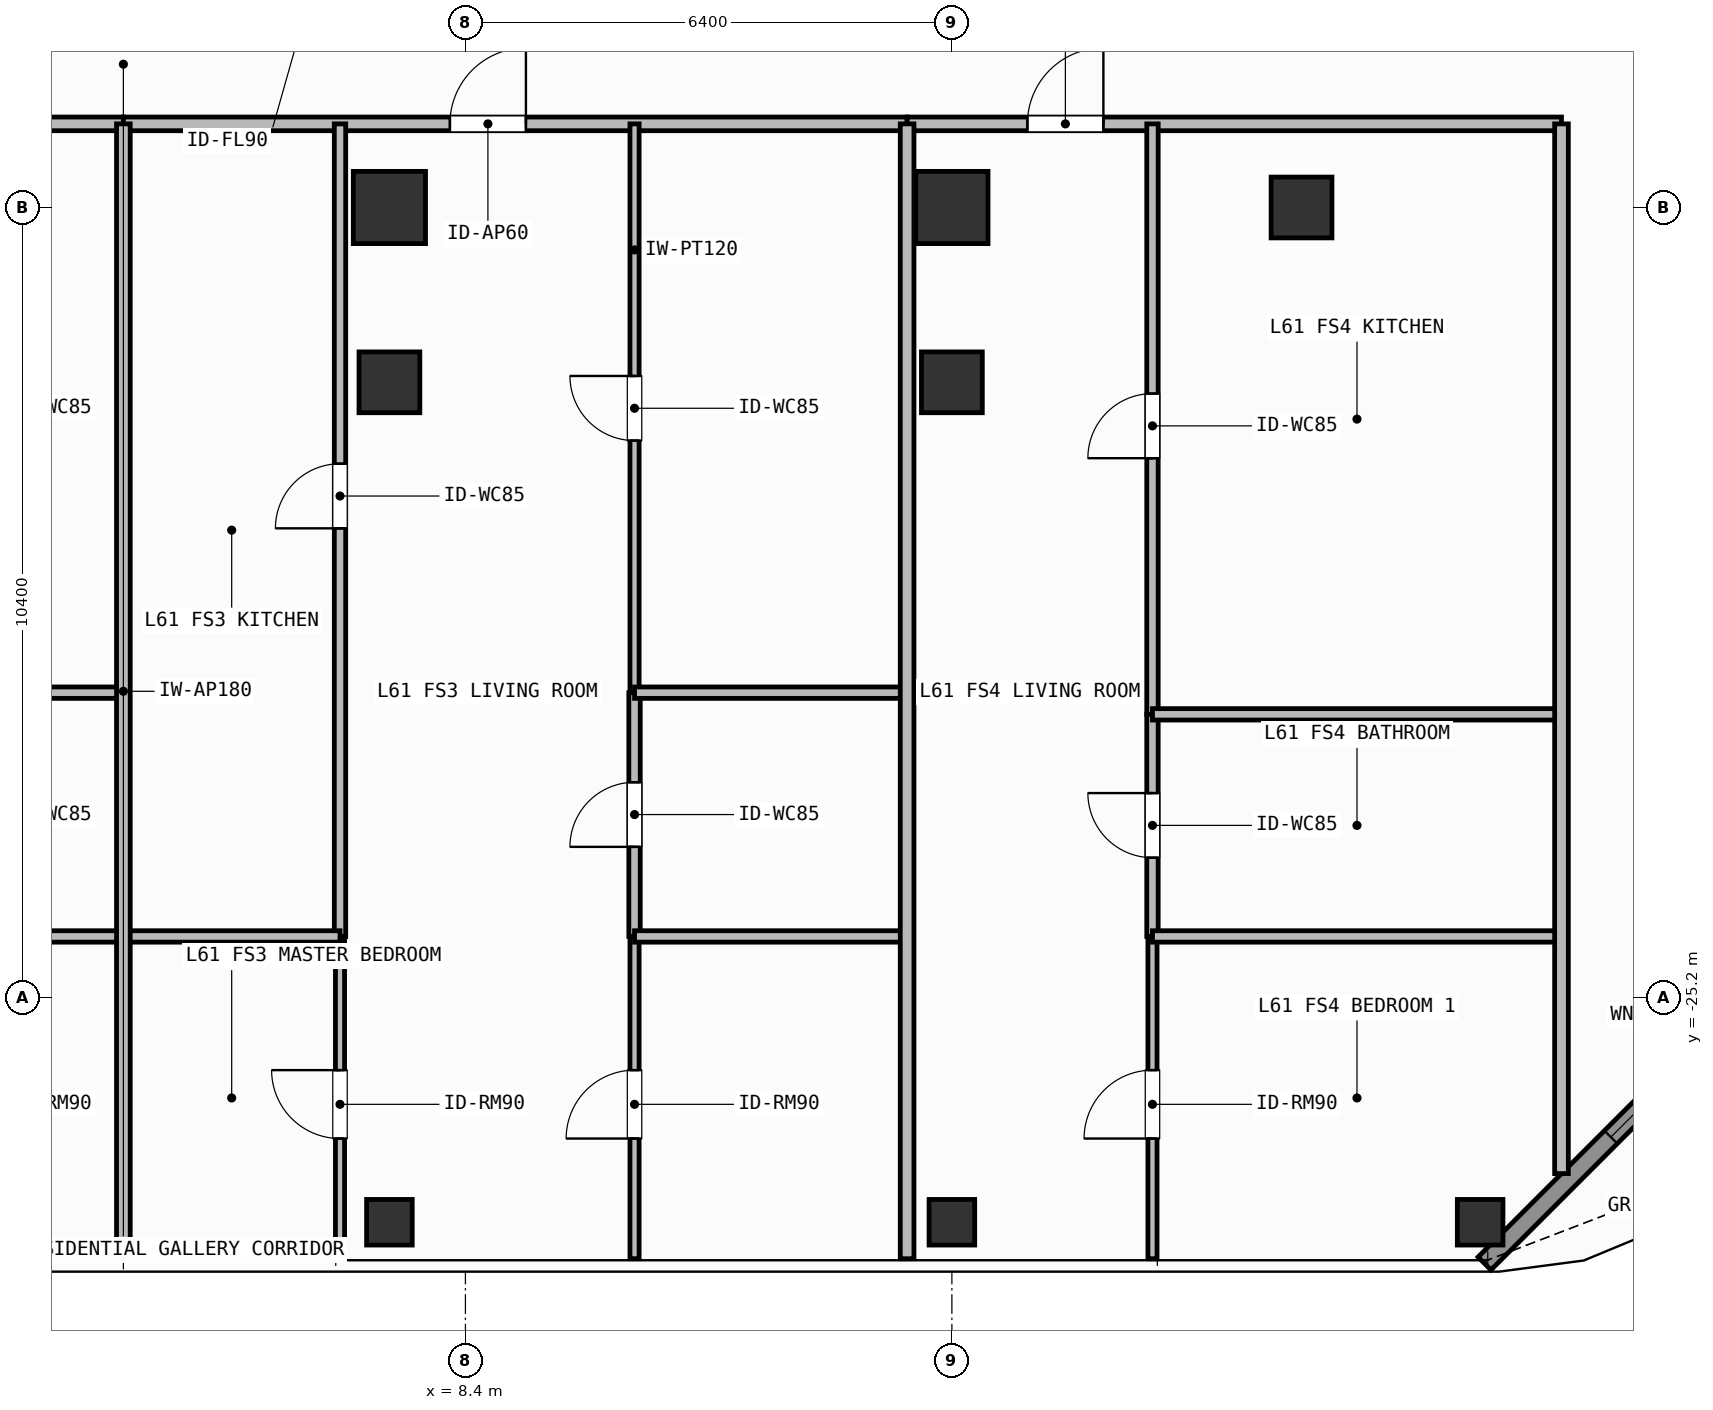
"""IFC4 building model, lengths in metres.
Left out: names, types, materials, properties, quantities, classifications, styles, units other than length and angle.
Written with IfcOpenShell. Run it as: python <this file> out.ifc"""

import sys

from ifc_helpers import new_model, si_unit, direction, frame, frame_2d, origin, origin_2d, place, context, subcontext, project, spatial, rectangle, hollow_rectangle, extrude, element, fill, save


model = new_model("IFC4")
c1 = context("Model", 3, precision=1e-05, world=origin(), true_north=direction((0.0, 1.0)))
c2 = subcontext(c1, "Body", "Model", "MODEL_VIEW")
j1 = project(units=[si_unit("LENGTHUNIT", "METRE"), si_unit("PLANEANGLEUNIT", "RADIAN")], contexts=[c1])
p1 = place(None, origin())
s1 = spatial("IfcSite", under=j1, at=p1, CompositionType="ELEMENT")
p2 = place(p1, origin())
s2 = spatial("IfcBuilding", under=s1, at=p2, CompositionType="ELEMENT")
p3 = place(p2, frame((0.0, 0.0, 250.8)))
s3 = spatial("IfcBuildingStorey", under=s2, at=p3, CompositionType="ELEMENT", Elevation=250.8)
for number, where, z_axis, x_axis in (
    (1, (7.4, -14.8, 0.0), (0.0, 0.0, 1.0), (1.0, 0.0, 0.0)),
    (2, (14.8, -14.8, 0.0), (0.0, 0.0, 1.0), (1.0, 0.0, 0.0)),
):
    element("IfcColumn", number, at=place(p3, frame(where, z_axis=z_axis, x_axis=x_axis)), inside=s3, PredefinedType="COLUMN", context=c2, shape_type="SweptSolid", body=[
        extrude(rectangle(XDim=0.95, YDim=0.95, at=origin_2d()), origin(), (0.0, 0.0, 1.0), 3.9),
    ])
for number, where, z_axis, x_axis in (
    (3, (19.4, -14.8, 0.0), (0.0, 0.0, 1.0), (1.0, 0.0, 0.0)),
    (4, (7.4, -17.1, 0.0), (0.0, 0.0, 1.0), (1.0, 0.0, 0.0)),
    (5, (14.8, -17.1, 0.0), (0.0, 0.0, 1.0), (1.0, 0.0, 0.0)),
):
    element("IfcColumn", number, at=place(p3, frame(where, z_axis=z_axis, x_axis=x_axis)), inside=s3, PredefinedType="COLUMN", context=c2, shape_type="SweptSolid", body=[
        extrude(hollow_rectangle(XDim=0.8, YDim=0.8, WallThickness=0.036, at=origin_2d()), origin(), (0.0, 0.0, 1.0), 3.9),
    ])
for number, where, z_axis, x_axis in (
    (6, (21.75, -28.15, 0.0), (0.0, 0.0, 1.0), (1.0, 0.0, 0.0)),
    (7, (7.4, -28.15, 0.0), (0.0, 0.0, 1.0), (1.0, 0.0, 0.0)),
    (8, (14.8, -28.15, 0.0), (0.0, 0.0, 1.0), (1.0, 0.0, 0.0)),
):
    element("IfcColumn", number, at=place(p3, frame(where, z_axis=z_axis, x_axis=x_axis)), inside=s3, PredefinedType="COLUMN", context=c2, shape_type="SweptSolid", body=[
        extrude(hollow_rectangle(XDim=0.6, YDim=0.6, WallThickness=0.028, at=origin_2d()), origin(), (0.0, 0.0, 1.0), 3.9),
    ])
p4 = place(p3, frame((26.192, -24.308, 0.0), z_axis=(0.0, 0.0, 1.0), x_axis=(-0.707106781187, -0.707106781187, 0.0)))
e9 = element("IfcWall", 9, at=p4, inside=s3, PredefinedType="SOLIDWALL", context=c2, shape_type="SweptSolid", body=[
    extrude(rectangle(XDim=6.201, YDim=0.24, at=frame_2d((3.101, 0.0))), origin(), (0.0, 0.0, 1.0), 3.62),
])
p5 = place(p4, frame((2.351, 0.0, 0.8)))
e10 = element("IfcOpeningElement", 10, at=p5, cuts=e9, PredefinedType="OPENING", context=c2, shape_type="SweptSolid", body=[
    extrude(rectangle(XDim=1.5, YDim=1.85, at=frame_2d((0.75, 0.925))), frame((0.0, 0.13, 0.0), z_axis=(0.0, -1.0, 0.0), x_axis=(1.0, 0.0, 0.0)), (0.0, 0.0, 1.0), 0.26),
])
p6 = place(p3, frame((-6.695, -13.7, 0.0), z_axis=(0.0, 0.0, 1.0), x_axis=(1.0, 0.0, 0.0)))
e11 = element("IfcWall", 11, at=p6, inside=s3, PredefinedType="PARTITIONING", context=c2, shape_type="SweptSolid", body=[
    extrude(rectangle(XDim=10.595, YDim=0.18, at=frame_2d((5.297, 0.0))), origin(), (0.0, 0.0, 1.0), 3.62),
])
p7 = place(p6, frame((5.154, 0.0, 0.0)))
e12 = element("IfcOpeningElement", 12, at=p7, cuts=e11, PredefinedType="OPENING", context=c2, shape_type="SweptSolid", body=[
    extrude(rectangle(XDim=1.0, YDim=2.2, at=frame_2d((0.5, 1.1))), frame((0.0, 0.1, 0.0), z_axis=(0.0, -1.0, 0.0), x_axis=(1.0, 0.0, 0.0)), (0.0, 0.0, 1.0), 0.2),
])
p8 = place(p3, frame((3.9, -13.7, 0.0), z_axis=(0.0, 0.0, 1.0), x_axis=(1.0, 0.0, 0.0)))
e13 = element("IfcWall", 13, at=p8, inside=s3, PredefinedType="PARTITIONING", context=c2, shape_type="SweptSolid", body=[
    extrude(rectangle(XDim=10.311, YDim=0.18, at=frame_2d((5.156, 0.0))), origin(), (0.0, 0.0, 1.0), 3.62),
])
p9 = place(p8, frame((4.296, 0.0, 0.0)))
e14 = element("IfcOpeningElement", 14, at=p9, cuts=e13, PredefinedType="OPENING", context=c2, shape_type="SweptSolid", body=[
    extrude(rectangle(XDim=1.0, YDim=2.2, at=frame_2d((0.5, 1.1))), frame((0.0, 0.1, 0.0), z_axis=(0.0, -1.0, 0.0), x_axis=(1.0, 0.0, 0.0)), (0.0, 0.0, 1.0), 0.2),
])
p10 = place(p3, frame((6.75, -24.39, 0.0), z_axis=(0.0, 0.0, 1.0), x_axis=(0.0, 1.0, 0.0)))
e15 = element("IfcWall", 15, at=p10, inside=s3, PredefinedType="PARTITIONING", context=c2, shape_type="SweptSolid", body=[
    extrude(rectangle(XDim=10.69, YDim=0.15, at=frame_2d((5.345, 0.0))), origin(), (0.0, 0.0, 1.0), 3.62),
])
p11 = place(p10, frame((5.369, 0.0, 0.0)))
e16 = element("IfcOpeningElement", 16, at=p11, cuts=e15, PredefinedType="OPENING", context=c2, shape_type="SweptSolid", body=[
    extrude(rectangle(XDim=0.85, YDim=2.1, at=frame_2d((0.425, 1.05))), frame((0.0, 0.085, 0.0), z_axis=(0.0, -1.0, 0.0), x_axis=(1.0, 0.0, 0.0)), (0.0, 0.0, 1.0), 0.17),
])
p12 = place(p3, frame((6.75, -28.63, 0.0), z_axis=(0.0, 0.0, 1.0), x_axis=(0.0, 1.0, 0.0)))
e17 = element("IfcWall", 17, at=p12, inside=s3, PredefinedType="PARTITIONING", context=c2, shape_type="SweptSolid", body=[
    extrude(rectangle(XDim=4.24, YDim=0.12, at=frame_2d((2.12, 0.0))), origin(), (0.0, 0.0, 1.0), 3.62),
])
p13 = place(p12, frame((1.581, 0.0, 0.0)))
e18 = element("IfcOpeningElement", 18, at=p13, cuts=e17, PredefinedType="OPENING", context=c2, shape_type="SweptSolid", body=[
    extrude(rectangle(XDim=0.9, YDim=2.1, at=frame_2d((0.45, 1.05))), frame((0.0, 0.07, 0.0), z_axis=(0.0, -1.0, 0.0), x_axis=(1.0, 0.0, 0.0)), (0.0, 0.0, 1.0), 0.14),
])
p14 = place(p3, frame((10.625, -24.39, 0.0), z_axis=(0.0, 0.0, 1.0), x_axis=(0.0, 1.0, 0.0)))
e19 = element("IfcWall", 19, at=p14, inside=s3, PredefinedType="PARTITIONING", context=c2, shape_type="SweptSolid", body=[
    extrude(rectangle(XDim=3.207, YDim=0.15, at=frame_2d((1.604, 0.0))), origin(), (0.0, 0.0, 1.0), 3.62),
])
p15 = place(p14, frame((1.178, 0.0, 0.0)))
e20 = element("IfcOpeningElement", 20, at=p15, cuts=e19, PredefinedType="OPENING", context=c2, shape_type="SweptSolid", body=[
    extrude(rectangle(XDim=0.85, YDim=2.1, at=frame_2d((0.425, 1.05))), frame((0.0, 0.085, 0.0), z_axis=(0.0, -1.0, 0.0), x_axis=(1.0, 0.0, 0.0)), (0.0, 0.0, 1.0), 0.17),
])
p16 = place(p3, frame((10.625, -21.183, 0.0), z_axis=(0.0, 0.0, 1.0), x_axis=(0.0, 1.0, 0.0)))
e21 = element("IfcWall", 21, at=p16, inside=s3, PredefinedType="PARTITIONING", context=c2, shape_type="SweptSolid", body=[
    extrude(rectangle(XDim=7.483, YDim=0.12, at=frame_2d((3.742, 0.0))), origin(), (0.0, 0.0, 1.0), 3.62),
])
p17 = place(p16, frame((3.316, 0.0, 0.0)))
e22 = element("IfcOpeningElement", 22, at=p17, cuts=e21, PredefinedType="OPENING", context=c2, shape_type="SweptSolid", body=[
    extrude(rectangle(XDim=0.85, YDim=2.1, at=frame_2d((0.425, 1.05))), frame((0.0, 0.07, 0.0), z_axis=(0.0, -1.0, 0.0), x_axis=(1.0, 0.0, 0.0)), (0.0, 0.0, 1.0), 0.14),
])
p18 = place(p3, frame((10.625, -28.63, 0.0), z_axis=(0.0, 0.0, 1.0), x_axis=(0.0, 1.0, 0.0)))
e23 = element("IfcWall", 23, at=p18, inside=s3, PredefinedType="PARTITIONING", context=c2, shape_type="SweptSolid", body=[
    extrude(rectangle(XDim=4.24, YDim=0.12, at=frame_2d((2.12, 0.0))), origin(), (0.0, 0.0, 1.0), 3.62),
])
p19 = place(p18, frame((1.581, 0.0, 0.0)))
e24 = element("IfcOpeningElement", 24, at=p19, cuts=e23, PredefinedType="OPENING", context=c2, shape_type="SweptSolid", body=[
    extrude(rectangle(XDim=0.9, YDim=2.1, at=frame_2d((0.45, 1.05))), frame((0.0, 0.07, 0.0), z_axis=(0.0, -1.0, 0.0), x_axis=(1.0, 0.0, 0.0)), (0.0, 0.0, 1.0), 0.14),
])
p20 = place(p3, frame((14.211, -13.7, 0.0), z_axis=(0.0, 0.0, 1.0), x_axis=(1.0, 0.0, 0.0)))
e25 = element("IfcWall", 25, at=p20, inside=s3, PredefinedType="PARTITIONING", context=c2, shape_type="SweptSolid", body=[
    extrude(rectangle(XDim=8.609, YDim=0.18, at=frame_2d((4.305, 0.0))), origin(), (0.0, 0.0, 1.0), 3.62),
])
p21 = place(p20, frame((1.582, 0.0, 0.0)))
e26 = element("IfcOpeningElement", 26, at=p21, cuts=e25, PredefinedType="OPENING", context=c2, shape_type="SweptSolid", body=[
    extrude(rectangle(XDim=1.0, YDim=2.2, at=frame_2d((0.5, 1.1))), frame((0.0, 0.1, 0.0), z_axis=(0.0, -1.0, 0.0), x_axis=(1.0, 0.0, 0.0)), (0.0, 0.0, 1.0), 0.2),
])
p22 = place(p3, frame((17.439, -21.468, 0.0), z_axis=(0.0, 0.0, 1.0), x_axis=(0.0, 1.0, 0.0)))
e27 = element("IfcWall", 27, at=p22, inside=s3, PredefinedType="PARTITIONING", context=c2, shape_type="SweptSolid", body=[
    extrude(rectangle(XDim=7.768, YDim=0.15, at=frame_2d((3.884, 0.0))), origin(), (0.0, 0.0, 1.0), 3.62),
])
p23 = place(p22, frame((3.37, 0.0, 0.0)))
e28 = element("IfcOpeningElement", 28, at=p23, cuts=e27, PredefinedType="OPENING", context=c2, shape_type="SweptSolid", body=[
    extrude(rectangle(XDim=0.85, YDim=2.1, at=frame_2d((0.425, 1.05))), frame((0.0, 0.085, 0.0), z_axis=(0.0, -1.0, 0.0), x_axis=(1.0, 0.0, 0.0)), (0.0, 0.0, 1.0), 0.17),
])
p24 = place(p3, frame((17.439, -24.39, 0.0), z_axis=(0.0, 0.0, 1.0), x_axis=(0.0, 1.0, 0.0)))
e29 = element("IfcWall", 29, at=p24, inside=s3, PredefinedType="PARTITIONING", context=c2, shape_type="SweptSolid", body=[
    extrude(rectangle(XDim=2.922, YDim=0.15, at=frame_2d((1.461, 0.0))), origin(), (0.0, 0.0, 1.0), 3.62),
])
p25 = place(p24, frame((1.036, 0.0, 0.0)))
e30 = element("IfcOpeningElement", 30, at=p25, cuts=e29, PredefinedType="OPENING", context=c2, shape_type="SweptSolid", body=[
    extrude(rectangle(XDim=0.85, YDim=2.1, at=frame_2d((0.425, 1.05))), frame((0.0, 0.085, 0.0), z_axis=(0.0, -1.0, 0.0), x_axis=(1.0, 0.0, 0.0)), (0.0, 0.0, 1.0), 0.17),
])
p26 = place(p3, frame((17.439, -28.63, 0.0), z_axis=(0.0, 0.0, 1.0), x_axis=(0.0, 1.0, 0.0)))
e31 = element("IfcWall", 31, at=p26, inside=s3, PredefinedType="PARTITIONING", context=c2, shape_type="SweptSolid", body=[
    extrude(rectangle(XDim=4.24, YDim=0.12, at=frame_2d((2.12, 0.0))), origin(), (0.0, 0.0, 1.0), 3.62),
])
p27 = place(p26, frame((1.581, 0.0, 0.0)))
e32 = element("IfcOpeningElement", 32, at=p27, cuts=e31, PredefinedType="OPENING", context=c2, shape_type="SweptSolid", body=[
    extrude(rectangle(XDim=0.9, YDim=2.1, at=frame_2d((0.45, 1.05))), frame((0.0, 0.07, 0.0), z_axis=(0.0, -1.0, 0.0), x_axis=(1.0, 0.0, 0.0)), (0.0, 0.0, 1.0), 0.14),
])
for number, where, z_axis, x_axis in (
    (33, (1.05, -21.183, 0.0), (0.0, 0.0, 1.0), (1.0, 0.0, 0.0)),
    (34, (1.05, -24.39, 0.0), (0.0, 0.0, 1.0), (1.0, 0.0, 0.0)),
):
    element("IfcWall", number, at=place(p3, frame(where, z_axis=z_axis, x_axis=x_axis)), inside=s3, PredefinedType="PARTITIONING", context=c2, shape_type="SweptSolid", body=[
        extrude(rectangle(XDim=2.85, YDim=0.15, at=frame_2d((1.425, 0.0))), origin(), (0.0, 0.0, 1.0), 3.62),
    ])
p28 = place(p3, frame((3.9, -24.39, 0.0), z_axis=(0.0, 0.0, 1.0), x_axis=(1.0, 0.0, 0.0)))
e35 = element("IfcWall", 35, at=p28, inside=s3, PredefinedType="PARTITIONING", context=c2, shape_type="SweptSolid", body=[
    extrude(rectangle(XDim=2.85, YDim=0.15, at=frame_2d((1.425, 0.0))), origin(), (0.0, 0.0, 1.0), 3.62),
])
for number, where, z_axis, x_axis in (
    (36, (10.625, -21.183, 0.0), (0.0, 0.0, 1.0), (1.0, 0.0, 0.0)),
    (37, (10.625, -24.39, 0.0), (0.0, 0.0, 1.0), (1.0, 0.0, 0.0)),
):
    element("IfcWall", number, at=place(p3, frame(where, z_axis=z_axis, x_axis=x_axis)), inside=s3, PredefinedType="PARTITIONING", context=c2, shape_type="SweptSolid", body=[
        extrude(rectangle(XDim=3.586, YDim=0.15, at=frame_2d((1.793, 0.0))), origin(), (0.0, 0.0, 1.0), 3.62),
    ])
p29 = place(p3, frame((3.9, -28.63, 0.0), z_axis=(0.0, 0.0, 1.0), x_axis=(0.0, 1.0, 0.0)))
e38 = element("IfcWall", 38, at=p29, inside=s3, PredefinedType="PARTITIONING", context=c2, shape_type="SweptSolid", body=[
    extrude(rectangle(XDim=14.93, YDim=0.18, at=frame_2d((7.465, 0.0))), origin(), (0.0, 0.0, 1.0), 3.62),
])
for number, where, z_axis, x_axis in (
    (39, (17.439, -21.468, 0.0), (0.0, 0.0, 1.0), (1.0, 0.0, 0.0)),
    (40, (17.439, -24.39, 0.0), (0.0, 0.0, 1.0), (1.0, 0.0, 0.0)),
):
    element("IfcWall", number, at=place(p3, frame(where, z_axis=z_axis, x_axis=x_axis)), inside=s3, PredefinedType="PARTITIONING", context=c2, shape_type="SweptSolid", body=[
        extrude(rectangle(XDim=5.381, YDim=0.15, at=frame_2d((2.69, 0.0))), origin(), (0.0, 0.0, 1.0), 3.62),
    ])
p30 = place(p3, frame((14.211, -28.63, 0.0), z_axis=(0.0, 0.0, 1.0), x_axis=(0.0, 1.0, 0.0)))
e41 = element("IfcWall", 41, at=p30, inside=s3, PredefinedType="PARTITIONING", context=c2, shape_type="SweptSolid", body=[
    extrude(rectangle(XDim=14.93, YDim=0.18, at=frame_2d((7.465, 0.0))), origin(), (0.0, 0.0, 1.0), 3.62),
])
p31 = place(p3, frame((22.82, -27.51, 0.0), z_axis=(0.0, 0.0, 1.0), x_axis=(0.0, 1.0, 0.0)))
e42 = element("IfcWall", 42, at=p31, inside=s3, PredefinedType="PARTITIONING", context=c2, shape_type="SweptSolid", body=[
    extrude(rectangle(XDim=13.81, YDim=0.18, at=frame_2d((6.905, 0.0))), origin(), (0.0, 0.0, 1.0), 3.62),
])
p32 = place(p5, origin())
e43 = element("IfcWindow", 43, at=p32, inside=s3, PartitioningType="SINGLE_PANEL", PredefinedType="WINDOW", context=c2, shape_type="SweptSolid", body=[
    extrude(rectangle(XDim=1.5, YDim=1.85, at=frame_2d((0.75, 0.925))), frame((0.0, 0.03, 0.0), z_axis=(0.0, -1.0, 0.0), x_axis=(1.0, 0.0, 0.0)), (0.0, 0.0, 1.0), 0.06),
])
fill(e10, e43)
p33 = place(p9, origin())
e44 = element("IfcDoor", 44, at=p33, inside=s3, OperationType="SINGLE_SWING_RIGHT", PredefinedType="DOOR", context=c2, shape_type="SweptSolid", body=[
    extrude(rectangle(XDim=1.0, YDim=2.2, at=frame_2d((0.5, 1.1))), frame((0.0, 0.025, 0.0), z_axis=(0.0, -1.0, 0.0), x_axis=(1.0, 0.0, 0.0)), (0.0, 0.0, 1.0), 0.05),
])
fill(e14, e44)
p34 = place(p11, origin())
e45 = element("IfcDoor", 45, at=p34, inside=s3, OperationType="SINGLE_SWING_LEFT", PredefinedType="DOOR", context=c2, shape_type="SweptSolid", body=[
    extrude(rectangle(XDim=0.85, YDim=2.1, at=frame_2d((0.425, 1.05))), frame((0.0, 0.025, 0.0), z_axis=(0.0, -1.0, 0.0), x_axis=(1.0, 0.0, 0.0)), (0.0, 0.0, 1.0), 0.05),
])
fill(e16, e45)
p35 = place(p13, origin())
e46 = element("IfcDoor", 46, at=p35, inside=s3, OperationType="SINGLE_SWING_RIGHT", PredefinedType="DOOR", context=c2, shape_type="SweptSolid", body=[
    extrude(rectangle(XDim=0.9, YDim=2.1, at=frame_2d((0.45, 1.05))), frame((0.0, 0.025, 0.0), z_axis=(0.0, -1.0, 0.0), x_axis=(1.0, 0.0, 0.0)), (0.0, 0.0, 1.0), 0.05),
])
fill(e18, e46)
p36 = place(p15, origin())
e47 = element("IfcDoor", 47, at=p36, inside=s3, OperationType="SINGLE_SWING_LEFT", PredefinedType="DOOR", context=c2, shape_type="SweptSolid", body=[
    extrude(rectangle(XDim=0.85, YDim=2.1, at=frame_2d((0.425, 1.05))), frame((0.0, 0.025, 0.0), z_axis=(0.0, -1.0, 0.0), x_axis=(1.0, 0.0, 0.0)), (0.0, 0.0, 1.0), 0.05),
])
fill(e20, e47)
p37 = place(p17, origin())
e48 = element("IfcDoor", 48, at=p37, inside=s3, OperationType="SINGLE_SWING_RIGHT", PredefinedType="DOOR", context=c2, shape_type="SweptSolid", body=[
    extrude(rectangle(XDim=0.85, YDim=2.1, at=frame_2d((0.425, 1.05))), frame((0.0, 0.025, 0.0), z_axis=(0.0, -1.0, 0.0), x_axis=(1.0, 0.0, 0.0)), (0.0, 0.0, 1.0), 0.05),
])
fill(e22, e48)
p38 = place(p19, origin())
e49 = element("IfcDoor", 49, at=p38, inside=s3, OperationType="SINGLE_SWING_LEFT", PredefinedType="DOOR", context=c2, shape_type="SweptSolid", body=[
    extrude(rectangle(XDim=0.9, YDim=2.1, at=frame_2d((0.45, 1.05))), frame((0.0, 0.025, 0.0), z_axis=(0.0, -1.0, 0.0), x_axis=(1.0, 0.0, 0.0)), (0.0, 0.0, 1.0), 0.05),
])
fill(e24, e49)
p39 = place(p21, origin())
e50 = element("IfcDoor", 50, at=p39, inside=s3, OperationType="SINGLE_SWING_RIGHT", PredefinedType="DOOR", context=c2, shape_type="SweptSolid", body=[
    extrude(rectangle(XDim=1.0, YDim=2.2, at=frame_2d((0.5, 1.1))), frame((0.0, 0.025, 0.0), z_axis=(0.0, -1.0, 0.0), x_axis=(1.0, 0.0, 0.0)), (0.0, 0.0, 1.0), 0.05),
])
fill(e26, e50)
p40 = place(p23, origin())
e51 = element("IfcDoor", 51, at=p40, inside=s3, OperationType="SINGLE_SWING_LEFT", PredefinedType="DOOR", context=c2, shape_type="SweptSolid", body=[
    extrude(rectangle(XDim=0.85, YDim=2.1, at=frame_2d((0.425, 1.05))), frame((0.0, 0.025, 0.0), z_axis=(0.0, -1.0, 0.0), x_axis=(1.0, 0.0, 0.0)), (0.0, 0.0, 1.0), 0.05),
])
fill(e28, e51)
p41 = place(p25, origin())
e52 = element("IfcDoor", 52, at=p41, inside=s3, OperationType="SINGLE_SWING_RIGHT", PredefinedType="DOOR", context=c2, shape_type="SweptSolid", body=[
    extrude(rectangle(XDim=0.85, YDim=2.1, at=frame_2d((0.425, 1.05))), frame((0.0, 0.025, 0.0), z_axis=(0.0, -1.0, 0.0), x_axis=(1.0, 0.0, 0.0)), (0.0, 0.0, 1.0), 0.05),
])
fill(e30, e52)
p42 = place(p27, origin())
e53 = element("IfcDoor", 53, at=p42, inside=s3, OperationType="SINGLE_SWING_LEFT", PredefinedType="DOOR", context=c2, shape_type="SweptSolid", body=[
    extrude(rectangle(XDim=0.9, YDim=2.1, at=frame_2d((0.45, 1.05))), frame((0.0, 0.025, 0.0), z_axis=(0.0, -1.0, 0.0), x_axis=(1.0, 0.0, 0.0)), (0.0, 0.0, 1.0), 0.05),
])
fill(e32, e53)
save(model, sys.argv[1])
